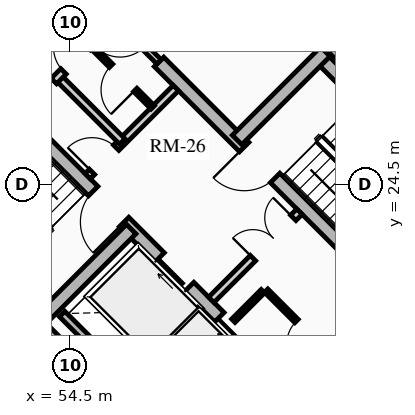
"""IFC4 building model, lengths in metres.
Left out: names, types, materials, properties, quantities, classifications, styles, units other than length and angle.
Written with IfcOpenShell. Run it as: python <this file> out.ifc"""

import sys

from ifc_helpers import new_model, si_unit, direction, frame, frame_2d, origin, place, context, subcontext, project, spatial, rectangle, extrude, source, transform, mapped, element, fill, save


model = new_model("IFC4")
c1 = context("Model", 3, precision=1e-05, world=origin(), true_north=direction((0.0, 1.0)))
c2 = subcontext(c1, "Body", "Model", "MODEL_VIEW")
j1 = project(units=[si_unit("LENGTHUNIT", "METRE"), si_unit("PLANEANGLEUNIT", "RADIAN")], contexts=[c1])
p1 = place(None, origin())
s1 = spatial("IfcSite", under=j1, at=p1, CompositionType="ELEMENT")
p2 = place(p1, origin())
s2 = spatial("IfcBuilding", under=s1, at=p2, CompositionType="ELEMENT")
p3 = place(p2, frame((0.0, 0.0, 183.61)))
s3 = spatial("IfcBuildingStorey", under=s2, at=p3, CompositionType="ELEMENT", Elevation=183.61)
for number, where, z_axis, x_axis in (
    (1, (58.702, 15.732, 0.0), (0.0, 0.0, 1.0), (-0.707, 0.707, 0.0)),
    (2, (66.268, 23.298, 0.0), (0.0, 0.0, 1.0), (-0.707, 0.707, 0.0)),
):
    element("IfcWall", number, at=place(p3, frame(where, z_axis=z_axis, x_axis=x_axis)), inside=s3, PredefinedType="SHEAR", context=c2, shape_type="SweptSolid", body=[
        extrude(rectangle(XDim=14.1, YDim=0.4, at=frame_2d((7.05, 0.0))), origin(), (0.0, 0.0, 1.0), 2.91),
    ])
p4 = place(p3, frame((58.561, 15.873, 0.0), z_axis=(0.0, 0.0, 1.0), x_axis=(0.707106781187, 0.707106781187, 0.0)))
e3 = element("IfcWall", 3, at=p4, inside=s3, PredefinedType="SHEAR", context=c2, shape_type="SweptSolid", body=[
    extrude(rectangle(XDim=10.7, YDim=0.4, at=frame_2d((5.35, 0.0))), origin(), (0.0, 0.0, 1.0), 2.91),
])
m1 = source(origin(), c2, "Body", "SweptSolid", [
    extrude(rectangle(XDim=1.5, YDim=2.02, at=frame_2d((0.75, 1.01))), frame((0.0, 0.21, 0.0), z_axis=(0.0, -1.0, 0.0), x_axis=(1.0, 0.0, 0.0)), (0.0, 0.0, 1.0), 0.42),
])
p5 = place(p4, frame((5.45, 0.0, 0.0)))
e4 = element("IfcOpeningElement", 4, at=p5, cuts=e3, PredefinedType="OPENING", context=c2, shape_type="MappedRepresentation", body=[
    mapped(m1, transform((0.0, 0.0, 0.0), x_axis=(1.0, 0.0, 0.0), y_axis=(0.0, 1.0, 0.0), z_axis=(0.0, 0.0, 1.0), scale=1.0)),
])
p6 = place(p3, frame((48.873, 25.561, 0.0), z_axis=(0.0, 0.0, 1.0), x_axis=(0.707106781187, 0.707106781187, 0.0)))
e5 = element("IfcWall", 5, at=p6, inside=s3, PredefinedType="SHEAR", context=c2, shape_type="SweptSolid", body=[
    extrude(rectangle(XDim=10.7, YDim=0.4, at=frame_2d((5.35, 0.0))), origin(), (0.0, 0.0, 1.0), 2.91),
])
p7 = place(p6, frame((4.6, 0.0, 0.0)))
e6 = element("IfcOpeningElement", 6, at=p7, cuts=e5, PredefinedType="OPENING", context=c2, shape_type="MappedRepresentation", body=[
    mapped(m1, transform((0.0, 0.0, 0.0), x_axis=(1.0, 0.0, 0.0), y_axis=(0.0, 1.0, 0.0), z_axis=(0.0, 0.0, 1.0), scale=1.0)),
])
p8 = place(p3, frame((61.06, 18.373, 0.0), z_axis=(0.0, 0.0, 1.0), x_axis=(-0.707106781187, 0.707106781187, 0.0)))
e7 = element("IfcWall", 7, at=p8, inside=s3, PredefinedType="SHEAR", context=c2, shape_type="SweptSolid", body=[
    extrude(rectangle(XDim=13.7, YDim=0.35, at=frame_2d((6.85, 0.0))), origin(), (0.0, 0.0, 1.0), 2.91),
])
m2 = source(origin(), c2, "Body", "SweptSolid", [
    extrude(rectangle(XDim=1.1, YDim=2.015, at=frame_2d((0.55, 1.007))), frame((0.0, 0.185, 0.0), z_axis=(0.0, -1.0, 0.0), x_axis=(1.0, 0.0, 0.0)), (0.0, 0.0, 1.0), 0.37),
])
p9 = place(p8, frame((4.85, 0.0, 0.0)))
e8 = element("IfcOpeningElement", 8, at=p9, cuts=e7, PredefinedType="OPENING", context=c2, shape_type="MappedRepresentation", body=[
    mapped(m2, transform((0.0, 0.0, 0.0), x_axis=(1.0, 0.0, 0.0), y_axis=(0.0, 1.0, 0.0), z_axis=(0.0, 0.0, 1.0), scale=1.0)),
])
p10 = place(p8, frame((0.625, 0.0, 0.0)))
e9 = element("IfcOpeningElement", 9, at=p10, cuts=e7, PredefinedType="OPENING", context=c2, shape_type="MappedRepresentation", body=[
    mapped(m2, transform((0.0, 0.0, 0.0), x_axis=(1.0, 0.0, 0.0), y_axis=(0.0, 1.0, 0.0), z_axis=(0.0, 0.0, 1.0), scale=1.0)),
])
p11 = place(p8, frame((2.625, 0.0, 0.0)))
e10 = element("IfcOpeningElement", 10, at=p11, cuts=e7, PredefinedType="OPENING", context=c2, shape_type="MappedRepresentation", body=[
    mapped(m2, transform((0.0, 0.0, 0.0), x_axis=(1.0, 0.0, 0.0), y_axis=(0.0, 1.0, 0.0), z_axis=(0.0, 0.0, 1.0), scale=1.0)),
])
m3 = source(origin(), c2, "Body", "SweptSolid", [
    extrude(rectangle(XDim=1.15, YDim=2.02, at=frame_2d((0.575, 1.01))), frame((0.0, 0.185, 0.0), z_axis=(0.0, -1.0, 0.0), x_axis=(1.0, 0.0, 0.0)), (0.0, 0.0, 1.0), 0.37),
])
p12 = place(p8, frame((7.27, 0.0, 0.0)))
e11 = element("IfcOpeningElement", 11, at=p12, cuts=e7, PredefinedType="OPENING", context=c2, shape_type="MappedRepresentation", body=[
    mapped(m3, transform((0.0, 0.0, 0.0), x_axis=(1.0, 0.0, 0.0), y_axis=(0.0, 1.0, 0.0), z_axis=(0.0, 0.0, 1.0), scale=1.0)),
])
p13 = place(p3, frame((63.627, 20.94, 0.0), z_axis=(0.0, 0.0, 1.0), x_axis=(-0.707119496762, 0.707094065383, 0.0)))
e12 = element("IfcWall", 12, at=p13, inside=s3, PredefinedType="SHEAR", context=c2, shape_type="SweptSolid", body=[
    extrude(rectangle(XDim=9.6, YDim=0.35, at=frame_2d((4.8, 0.0))), origin(), (0.0, 0.0, 1.0), 2.91),
])
p14 = place(p13, frame((5.28, 0.0, 0.0)))
e13 = element("IfcOpeningElement", 13, at=p14, cuts=e12, PredefinedType="OPENING", context=c2, shape_type="MappedRepresentation", body=[
    mapped(m3, transform((0.0, 0.0, 0.0), x_axis=(1.0, 0.0, 0.0), y_axis=(0.0, 1.0, 0.0), z_axis=(0.0, 0.0, 1.0), scale=1.0)),
])
p15 = place(p3, frame((53.922, 21.141, 0.0), z_axis=(0.0, 0.0, 1.0), x_axis=(-0.707106781187, 0.707106781187, 0.0)))
e14 = element("IfcWall", 14, at=p15, inside=s3, PredefinedType="SHEAR", context=c2, shape_type="SweptSolid", body=[
    extrude(rectangle(XDim=6.695, YDim=0.35, at=frame_2d((3.348, 0.0))), origin(), (0.0, 0.0, 1.0), 2.91),
])
p16 = place(p3, frame((53.784, 21.003, 0.0), z_axis=(0.0, 0.0, 1.0), x_axis=(0.707106781187, 0.707106781187, 0.0)))
e15 = element("IfcWall", 15, at=p16, inside=s3, PredefinedType="SHEAR", context=c2, shape_type="SweptSolid", body=[
    extrude(rectangle(XDim=3.285, YDim=0.35, at=frame_2d((1.643, 0.0))), origin(), (0.0, 0.0, 1.0), 2.91),
])
p17 = place(p3, frame((65.812, 23.125, 0.0), z_axis=(0.0, 0.0, 1.0), x_axis=(-0.707106781187, 0.707106781187, 0.0)))
e16 = element("IfcWall", 16, at=p17, inside=s3, PredefinedType="SHEAR", context=c2, shape_type="SweptSolid", body=[
    extrude(rectangle(XDim=6.695, YDim=0.35, at=frame_2d((3.348, 0.0))), origin(), (0.0, 0.0, 1.0), 2.91),
])
p18 = place(p3, frame((58.893, 25.674, 0.0), z_axis=(0.0, 0.0, 1.0), x_axis=(0.707106781187, 0.707106781187, 0.0)))
e17 = element("IfcWall", 17, at=p18, inside=s3, PredefinedType="SHEAR", context=c2, shape_type="SweptSolid", body=[
    extrude(rectangle(XDim=3.285, YDim=0.35, at=frame_2d((1.643, 0.0))), origin(), (0.0, 0.0, 1.0), 2.91),
])
p19 = place(p3, frame((55.888, 19.069, 0.0), z_axis=(0.0, 0.0, 1.0), x_axis=(0.707106781187, 0.707106781187, 0.0)))
e18 = element("IfcWall", 18, at=p19, inside=s3, PredefinedType="SHEAR", context=c2, shape_type="SweptSolid", body=[
    extrude(rectangle(XDim=2.97, YDim=0.2, at=frame_2d((1.485, 0.0))), origin(), (0.0, 0.0, 1.0), 2.91),
])
p20 = place(p3, frame((56.015, 19.366, 0.0), z_axis=(0.0, 0.0, 1.0), x_axis=(-0.707106781187, 0.707106781187, 0.0)))
e19 = element("IfcWall", 19, at=p20, inside=s3, PredefinedType="SHEAR", context=c2, shape_type="SweptSolid", body=[
    extrude(rectangle(XDim=2.44, YDim=0.2, at=frame_2d((1.22, 0.0))), origin(), (0.0, 0.0, 1.0), 2.91),
])
p21 = place(p3, frame((58.214, 21.467, 0.0), z_axis=(0.0, 0.0, 1.0), x_axis=(0.707106781187, 0.707106781187, 0.0)))
e20 = element("IfcWall", 20, at=p21, inside=s3, PredefinedType="PARTITIONING", context=c2, shape_type="SweptSolid", body=[
    extrude(rectangle(XDim=3.28, YDim=0.2, at=frame_2d((1.64, 0.0))), origin(), (0.0, 0.0, 1.0), 2.675),
])
m4 = source(origin(), c2, "Body", "SweptSolid", [
    extrude(rectangle(XDim=1.5, YDim=2.02, at=frame_2d((0.75, 1.01))), frame((0.0, 0.11, 0.0), z_axis=(0.0, -1.0, 0.0), x_axis=(1.0, 0.0, 0.0)), (0.0, 0.0, 1.0), 0.22),
])
p22 = place(p21, frame((1.55, 0.0, 0.0)))
e21 = element("IfcOpeningElement", 21, at=p22, cuts=e20, PredefinedType="OPENING", context=c2, shape_type="MappedRepresentation", body=[
    mapped(m4, transform((0.0, 0.0, 0.0), x_axis=(1.0, 0.0, 0.0), y_axis=(0.0, 1.0, 0.0), z_axis=(0.0, 0.0, 1.0), scale=1.0)),
])
p23 = place(p3, frame((54.961, 24.719, 0.0), z_axis=(0.0, 0.0, 1.0), x_axis=(0.707106781187, 0.707106781187, 0.0)))
e22 = element("IfcWall", 22, at=p23, inside=s3, PredefinedType="PARTITIONING", context=c2, shape_type="SweptSolid", body=[
    extrude(rectangle(XDim=3.28, YDim=0.2, at=frame_2d((1.64, 0.0))), origin(), (0.0, 0.0, 1.0), 2.675),
])
m5 = source(origin(), c2, "Body", "SweptSolid", [
    extrude(rectangle(XDim=0.9, YDim=2.005, at=frame_2d((0.45, 1.002))), frame((0.0, 0.11, 0.0), z_axis=(0.0, -1.0, 0.0), x_axis=(1.0, 0.0, 0.0)), (0.0, 0.0, 1.0), 0.22),
])
p24 = place(p23, frame((0.16, 0.0, 0.0)))
e23 = element("IfcOpeningElement", 23, at=p24, cuts=e22, PredefinedType="OPENING", context=c2, shape_type="MappedRepresentation", body=[
    mapped(m5, transform((0.0, 0.0, 0.0), x_axis=(1.0, 0.0, 0.0), y_axis=(0.0, 1.0, 0.0), z_axis=(0.0, 0.0, 1.0), scale=1.0)),
])
p25 = place(p3, frame((55.874, 25.631, 0.0), z_axis=(0.0, 0.0, 1.0), x_axis=(-0.707157639372, 0.707055919343, 0.0)))
e24 = element("IfcWall", 24, at=p25, inside=s3, PredefinedType="PARTITIONING", context=c2, shape_type="SweptSolid", body=[
    extrude(rectangle(XDim=2.4, YDim=0.2, at=frame_2d((1.2, 0.0))), origin(), (0.0, 0.0, 1.0), 2.675),
])
p26 = place(p3, frame((53.264, 26.416, 0.0), z_axis=(0.0, 0.0, 1.0), x_axis=(0.707106781187, 0.707106781187, 0.0)))
e25 = element("IfcWall", 25, at=p26, inside=s3, PredefinedType="PARTITIONING", context=c2, shape_type="SweptSolid", body=[
    extrude(rectangle(XDim=3.28, YDim=0.2, at=frame_2d((1.64, 0.0))), origin(), (0.0, 0.0, 1.0), 2.675),
])
m6 = source(origin(), c2, "Body", "SweptSolid", [
    extrude(rectangle(XDim=1.0, YDim=2.015, at=frame_2d((0.5, 1.007))), frame((0.0, 0.11, 0.0), z_axis=(0.0, -1.0, 0.0), x_axis=(1.0, 0.0, 0.0)), (0.0, 0.0, 1.0), 0.22),
])
p27 = place(p26, frame((0.14, 0.0, 0.0)))
e26 = element("IfcOpeningElement", 26, at=p27, cuts=e25, PredefinedType="OPENING", context=c2, shape_type="MappedRepresentation", body=[
    mapped(m6, transform((0.0, 0.0, 0.0), x_axis=(1.0, 0.0, 0.0), y_axis=(0.0, 1.0, 0.0), z_axis=(0.0, 0.0, 1.0), scale=1.0)),
])
p28 = place(p26, frame((1.5, 0.0, 0.0)))
e27 = element("IfcOpeningElement", 27, at=p28, cuts=e25, PredefinedType="OPENING", context=c2, shape_type="MappedRepresentation", body=[
    mapped(m5, transform((0.0, 0.0, 0.0), x_axis=(1.0, 0.0, 0.0), y_axis=(0.0, 1.0, 0.0), z_axis=(0.0, 0.0, 1.0), scale=1.0)),
])
p29 = place(p3, frame((61.835, 19.529, 0.0), z_axis=(0.0, 0.0, 1.0), x_axis=(-0.707146413884, 0.707067146267, 0.0)))
e28 = element("IfcWall", 28, at=p29, inside=s3, PredefinedType="PARTITIONING", context=c2, shape_type="SweptSolid", body=[
    extrude(rectangle(XDim=3.08, YDim=0.125, at=frame_2d((1.54, 0.0))), origin(), (0.0, 0.0, 1.0), 2.675),
])
m7 = source(origin(), c2, "Body", "SweptSolid", [
    extrude(rectangle(XDim=0.9, YDim=2.005, at=frame_2d((0.45, 1.002))), frame((0.0, 0.073, 0.0), z_axis=(0.0, -1.0, 0.0), x_axis=(1.0, 0.0, 0.0)), (0.0, 0.0, 1.0), 0.145),
])
p30 = place(p29, frame((1.05, 0.0, 0.0)))
e29 = element("IfcOpeningElement", 29, at=p30, cuts=e28, PredefinedType="OPENING", context=c2, shape_type="MappedRepresentation", body=[
    mapped(m7, transform((0.0, 0.0, 0.0), x_axis=(1.0, 0.0, 0.0), y_axis=(0.0, 1.0, 0.0), z_axis=(0.0, 0.0, 1.0), scale=1.0)),
])
p31 = place(p3, frame((58.794, 20.915, 0.0), z_axis=(0.0, 0.0, 1.0), x_axis=(0.707106781187, 0.707106781187, 0.0)))
e30 = element("IfcWall", 30, at=p31, inside=s3, PredefinedType="PARTITIONING", context=c2, shape_type="SweptSolid", body=[
    extrude(rectangle(XDim=1.1, YDim=0.125, at=frame_2d((0.55, 0.0))), origin(), (0.0, 0.0, 1.0), 2.675),
])
p32 = place(p3, frame((56.673, 26.529, 0.0), z_axis=(0.0, 0.0, 1.0), x_axis=(-0.707052764397, 0.70716079385, 0.0)))
e31 = element("IfcWall", 31, at=p32, inside=s3, PredefinedType="PARTITIONING", context=c2, shape_type="SweptSolid", body=[
    extrude(rectangle(XDim=2.26, YDim=0.125, at=frame_2d((1.13, 0.0))), origin(), (0.0, 0.0, 1.0), 2.675),
])
p33 = place(p32, frame((0.65, 0.0, 0.0)))
e32 = element("IfcOpeningElement", 32, at=p33, cuts=e31, PredefinedType="OPENING", context=c2, shape_type="MappedRepresentation", body=[
    mapped(m7, transform((0.0, 0.0, 0.0), x_axis=(1.0, 0.0, 0.0), y_axis=(0.0, 1.0, 0.0), z_axis=(0.0, 0.0, 1.0), scale=1.0)),
])
p34 = place(p3, frame((56.839, 27.728, 0.0), z_axis=(0.0, 0.0, 1.0), x_axis=(-0.707106781187, 0.707106781187, 0.0)))
e33 = element("IfcWall", 33, at=p34, inside=s3, PredefinedType="PARTITIONING", context=c2, shape_type="SweptSolid", body=[
    extrude(rectangle(XDim=3.9, YDim=0.16, at=frame_2d((1.95, 0.0))), origin(), (0.0, 0.0, 1.0), 2.675),
])
m8 = source(origin(), c2, "Body", "SweptSolid", [
    extrude(rectangle(XDim=0.9, YDim=2.005, at=frame_2d((0.45, 1.002))), frame((0.0, 0.09, 0.0), z_axis=(0.0, -1.0, 0.0), x_axis=(1.0, 0.0, 0.0)), (0.0, 0.0, 1.0), 0.18),
])
p35 = place(p34, frame((0.55, 0.0, 0.0)))
e34 = element("IfcOpeningElement", 34, at=p35, cuts=e33, PredefinedType="OPENING", context=c2, shape_type="MappedRepresentation", body=[
    mapped(m8, transform((0.0, 0.0, 0.0), x_axis=(1.0, 0.0, 0.0), y_axis=(0.0, 1.0, 0.0), z_axis=(0.0, 0.0, 1.0), scale=1.0)),
])
p36 = place(p34, frame((2.35, 0.0, 0.0)))
e35 = element("IfcOpeningElement", 35, at=p36, cuts=e33, PredefinedType="OPENING", context=c2, shape_type="MappedRepresentation", body=[
    mapped(m8, transform((0.0, 0.0, 0.0), x_axis=(1.0, 0.0, 0.0), y_axis=(0.0, 1.0, 0.0), z_axis=(0.0, 0.0, 1.0), scale=1.0)),
])
m9 = source(origin(), c2, "Body", "SweptSolid", [
    extrude(rectangle(XDim=1.1, YDim=2.015, at=frame_2d((0.55, 1.007))), frame((0.0, 0.025, 0.0), z_axis=(0.0, -1.0, 0.0), x_axis=(1.0, 0.0, 0.0)), (0.0, 0.0, 1.0), 0.05),
])
p37 = place(p9, origin())
e36 = element("IfcDoor", 36, at=p37, inside=s3, OperationType="SLIDING_TO_RIGHT", PredefinedType="DOOR", context=c2, shape_type="MappedRepresentation", body=[
    mapped(m9, transform((0.0, 0.0, 0.0), x_axis=(1.0, 0.0, 0.0), y_axis=(0.0, 1.0, 0.0), z_axis=(0.0, 0.0, 1.0), scale=1.0)),
])
fill(e8, e36)
p38 = place(p11, origin())
e37 = element("IfcDoor", 37, at=p38, inside=s3, OperationType="SLIDING_TO_RIGHT", PredefinedType="DOOR", context=c2, shape_type="MappedRepresentation", body=[
    mapped(m9, transform((0.0, 0.0, 0.0), x_axis=(1.0, 0.0, 0.0), y_axis=(0.0, 1.0, 0.0), z_axis=(0.0, 0.0, 1.0), scale=1.0)),
])
fill(e10, e37)
m10 = source(origin(), c2, "Body", "SweptSolid", [
    extrude(rectangle(XDim=1.15, YDim=2.02, at=frame_2d((0.575, 1.01))), frame((0.0, 0.025, 0.0), z_axis=(0.0, -1.0, 0.0), x_axis=(1.0, 0.0, 0.0)), (0.0, 0.0, 1.0), 0.05),
])
p39 = place(p12, origin())
e38 = element("IfcDoor", 38, at=p39, inside=s3, OperationType="SINGLE_SWING_LEFT", PredefinedType="DOOR", context=c2, shape_type="MappedRepresentation", body=[
    mapped(m10, transform((0.0, 0.0, 0.0), x_axis=(1.0, 0.0, 0.0), y_axis=(0.0, 1.0, 0.0), z_axis=(0.0, 0.0, 1.0), scale=1.0)),
])
fill(e11, e38)
p40 = place(p14, origin())
e39 = element("IfcDoor", 39, at=p40, inside=s3, OperationType="SINGLE_SWING_RIGHT", PredefinedType="DOOR", context=c2, shape_type="MappedRepresentation", body=[
    mapped(m10, transform((0.0, 0.0, 0.0), x_axis=(1.0, 0.0, 0.0), y_axis=(0.0, 1.0, 0.0), z_axis=(0.0, 0.0, 1.0), scale=1.0)),
])
fill(e13, e39)
m11 = source(origin(), c2, "Body", "SweptSolid", [
    extrude(rectangle(XDim=1.5, YDim=2.02, at=frame_2d((0.75, 1.01))), frame((0.0, 0.025, 0.0), z_axis=(0.0, -1.0, 0.0), x_axis=(1.0, 0.0, 0.0)), (0.0, 0.0, 1.0), 0.05),
])
p41 = place(p22, origin())
e40 = element("IfcDoor", 40, at=p41, inside=s3, OperationType="DOUBLE_DOOR_SINGLE_SWING", PredefinedType="DOOR", context=c2, shape_type="MappedRepresentation", body=[
    mapped(m11, transform((0.0, 0.0, 0.0), x_axis=(1.0, 0.0, 0.0), y_axis=(0.0, 1.0, 0.0), z_axis=(0.0, 0.0, 1.0), scale=1.0)),
])
fill(e21, e40)
m12 = source(origin(), c2, "Body", "SweptSolid", [
    extrude(rectangle(XDim=0.9, YDim=2.005, at=frame_2d((0.45, 1.002))), frame((0.0, 0.025, 0.0), z_axis=(0.0, -1.0, 0.0), x_axis=(1.0, 0.0, 0.0)), (0.0, 0.0, 1.0), 0.05),
])
p42 = place(p24, origin())
e41 = element("IfcDoor", 41, at=p42, inside=s3, OperationType="SINGLE_SWING_LEFT", PredefinedType="DOOR", context=c2, shape_type="MappedRepresentation", body=[
    mapped(m12, transform((0.0, 0.0, 0.0), x_axis=(1.0, 0.0, 0.0), y_axis=(0.0, 1.0, 0.0), z_axis=(0.0, 0.0, 1.0), scale=1.0)),
])
fill(e23, e41)
m13 = source(origin(), c2, "Body", "SweptSolid", [
    extrude(rectangle(XDim=1.0, YDim=2.015, at=frame_2d((0.5, 1.007))), frame((0.0, 0.025, 0.0), z_axis=(0.0, -1.0, 0.0), x_axis=(1.0, 0.0, 0.0)), (0.0, 0.0, 1.0), 0.05),
])
p43 = place(p27, origin())
e42 = element("IfcDoor", 42, at=p43, inside=s3, OperationType="SINGLE_SWING_RIGHT", PredefinedType="DOOR", context=c2, shape_type="MappedRepresentation", body=[
    mapped(m13, transform((0.0, 0.0, 0.0), x_axis=(1.0, 0.0, 0.0), y_axis=(0.0, 1.0, 0.0), z_axis=(0.0, 0.0, 1.0), scale=1.0)),
])
fill(e26, e42)
p44 = place(p30, origin())
e43 = element("IfcDoor", 43, at=p44, inside=s3, OperationType="SINGLE_SWING_LEFT", PredefinedType="DOOR", context=c2, shape_type="MappedRepresentation", body=[
    mapped(m12, transform((0.0, 0.0, 0.0), x_axis=(1.0, 0.0, 0.0), y_axis=(0.0, 1.0, 0.0), z_axis=(0.0, 0.0, 1.0), scale=1.0)),
])
fill(e29, e43)
p45 = place(p28, origin())
e44 = element("IfcDoor", 44, at=p45, inside=s3, OperationType="SINGLE_SWING_RIGHT", PredefinedType="DOOR", context=c2, shape_type="MappedRepresentation", body=[
    mapped(m12, transform((0.0, 0.0, 0.0), x_axis=(1.0, 0.0, 0.0), y_axis=(0.0, 1.0, 0.0), z_axis=(0.0, 0.0, 1.0), scale=1.0)),
])
fill(e27, e44)
p46 = place(p33, origin())
e45 = element("IfcDoor", 45, at=p46, inside=s3, OperationType="SINGLE_SWING_LEFT", PredefinedType="DOOR", context=c2, shape_type="MappedRepresentation", body=[
    mapped(m12, transform((0.0, 0.0, 0.0), x_axis=(1.0, 0.0, 0.0), y_axis=(0.0, 1.0, 0.0), z_axis=(0.0, 0.0, 1.0), scale=1.0)),
])
fill(e32, e45)
save(model, sys.argv[1])
